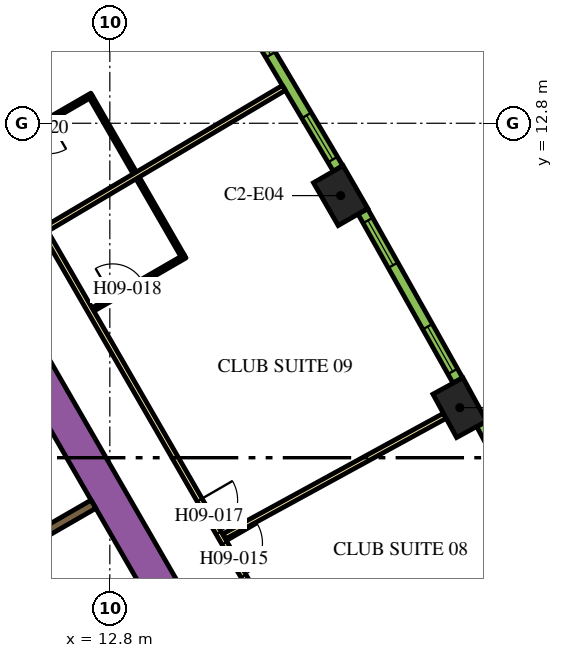
"""IFC4 building model, lengths in metres.
Left out: names, types, materials, properties, quantities, classifications, styles, units other than length and angle.
Written with IfcOpenShell. Run it as: python <this file> out.ifc"""

import sys

from ifc_helpers import new_model, si_unit, direction, frame, frame_2d, origin, origin_2d, place, context, subcontext, project, spatial, rectangle, extrude, element, fill, save


model = new_model("IFC4")
c1 = context("Model", 3, precision=1e-05, world=origin(), true_north=direction((0.0, 1.0)))
c2 = subcontext(c1, "Body", "Model", "MODEL_VIEW")
j1 = project(units=[si_unit("LENGTHUNIT", "METRE"), si_unit("PLANEANGLEUNIT", "RADIAN")], contexts=[c1])
p1 = place(None, origin())
s1 = spatial("IfcSite", under=j1, at=p1, CompositionType="ELEMENT")
p2 = place(p1, origin())
s2 = spatial("IfcBuilding", under=s1, at=p2, CompositionType="ELEMENT")
p3 = place(p2, frame((0.0, 0.0, 126.6)))
s3 = spatial("IfcBuildingStorey", under=s2, at=p3, CompositionType="ELEMENT", Elevation=126.6)
for number, where, z_axis, x_axis in (
    (1, (22.009, 5.317, 0.0), (0.0, 0.0, 1.0), (-0.48, 0.877, 0.0)),
    (2, (18.874, 10.897, 0.0), (0.0, 0.0, 1.0), (-0.5, 0.866, 0.0)),
):
    element("IfcColumn", number, at=place(p3, frame(where, z_axis=z_axis, x_axis=x_axis)), inside=s3, PredefinedType="COLUMN", context=c2, shape_type="SweptSolid", body=[
        extrude(rectangle(XDim=1.3, YDim=0.9, at=origin_2d()), origin(), (0.0, 0.0, 1.0), 3.9),
    ])
p4 = place(p3, frame((6.776, 13.364, 0.0), z_axis=(0.0, 0.0, 1.0), x_axis=(0.500004177138, -0.8660229921, 0.0)))
e3 = element("IfcWall", 3, at=p4, inside=s3, PredefinedType="SOLIDWALL", context=c2, shape_type="SweptSolid", body=[
    extrude(rectangle(XDim=20.204, YDim=0.9, at=frame_2d((10.102, 0.0))), origin(), (0.0, 0.0, 1.0), 3.9),
])
p5 = place(p3, frame((10.464, 1.677, 0.0), z_axis=(0.0, 0.0, 1.0), x_axis=(0.86605622881, 0.499946605688, 0.0)))
e4 = element("IfcWall", 4, at=p5, inside=s3, PredefinedType="SOLIDWALL", context=c2, shape_type="SweptSolid", body=[
    extrude(rectangle(XDim=2.2, YDim=0.25, at=frame_2d((1.1, 0.0))), origin(), (0.0, 0.0, 1.0), 3.9),
])
p6 = place(p3, frame((11.553, -0.46, 0.0), z_axis=(0.0, 0.0, 1.0), x_axis=(-0.500006514828, 0.866021642414, 0.0)))
e5 = element("IfcWall", 5, at=p6, inside=s3, PredefinedType="SOLIDWALL", context=c2, shape_type="SweptSolid", body=[
    extrude(rectangle(XDim=12.35, YDim=0.25, at=frame_2d((6.175, 0.0))), origin(), (0.0, 0.0, 1.0), 3.9),
])
p7 = place(p6, frame((0.585, 0.0, 0.0)))
e6 = element("IfcOpeningElement", 6, at=p7, cuts=e5, PredefinedType="OPENING", context=c2, shape_type="SweptSolid", body=[
    extrude(rectangle(XDim=1.1, YDim=2.1, at=frame_2d((0.55, 1.05))), frame((0.0, 0.135, 0.0), z_axis=(0.0, -1.0, 0.0), x_axis=(1.0, 0.0, 0.0)), (0.0, 0.0, 1.0), 0.27),
])
p8 = place(p6, frame((3.105, 0.0, 0.0)))
e7 = element("IfcOpeningElement", 7, at=p8, cuts=e5, PredefinedType="OPENING", context=c2, shape_type="SweptSolid", body=[
    extrude(rectangle(XDim=1.1, YDim=2.1, at=frame_2d((0.55, 1.05))), frame((0.0, 0.135, 0.0), z_axis=(0.0, -1.0, 0.0), x_axis=(1.0, 0.0, 0.0)), (0.0, 0.0, 1.0), 0.27),
])
p9 = place(p6, frame((5.625, 0.0, 0.0)))
e8 = element("IfcOpeningElement", 8, at=p9, cuts=e5, PredefinedType="OPENING", context=c2, shape_type="SweptSolid", body=[
    extrude(rectangle(XDim=1.1, YDim=2.1, at=frame_2d((0.55, 1.05))), frame((0.0, 0.135, 0.0), z_axis=(0.0, -1.0, 0.0), x_axis=(1.0, 0.0, 0.0)), (0.0, 0.0, 1.0), 0.27),
])
p10 = place(p3, frame((6.163, 18.475, 0.0), z_axis=(0.0, 0.0, 1.0), x_axis=(0.500001317485, -0.866024643133, 0.0)))
e9 = element("IfcWall", 9, at=p10, inside=s3, PredefinedType="PARTITIONING", context=c2, shape_type="SweptSolid", body=[
    extrude(rectangle(XDim=25.767, YDim=0.15, at=frame_2d((12.883, 0.0))), origin(), (0.0, 0.0, 1.0), 2.75),
])
p11 = place(p10, frame((19.306, 0.0, 0.0)))
e10 = element("IfcOpeningElement", 10, at=p11, cuts=e9, PredefinedType="OPENING", context=c2, shape_type="SweptSolid", body=[
    extrude(rectangle(XDim=1.0, YDim=2.1, at=frame_2d((0.5, 1.05))), frame((0.0, 0.085, 0.0), z_axis=(0.0, -1.0, 0.0), x_axis=(1.0, 0.0, 0.0)), (0.0, 0.0, 1.0), 0.17),
])
p12 = place(p10, frame((17.999, 0.0, 0.0)))
e11 = element("IfcOpeningElement", 11, at=p12, cuts=e9, PredefinedType="OPENING", context=c2, shape_type="SweptSolid", body=[
    extrude(rectangle(XDim=1.0, YDim=2.1, at=frame_2d((0.5, 1.05))), frame((0.0, 0.085, 0.0), z_axis=(0.0, -1.0, 0.0), x_axis=(1.0, 0.0, 0.0)), (0.0, 0.0, 1.0), 0.17),
])
p13 = place(p10, frame((0.596, 0.0, 0.0)))
e12 = element("IfcOpeningElement", 12, at=p13, cuts=e9, PredefinedType="OPENING", context=c2, shape_type="SweptSolid", body=[
    extrude(rectangle(XDim=1.0, YDim=2.1, at=frame_2d((0.5, 1.05))), frame((0.0, 0.085, 0.0), z_axis=(0.0, -1.0, 0.0), x_axis=(1.0, 0.0, 0.0)), (0.0, 0.0, 1.0), 0.17),
])
p14 = place(p3, frame((17.379, 13.731, 0.0), z_axis=(0.0, 0.0, 1.0), x_axis=(-0.860132461691, -0.510070728768, 0.0)))
e13 = element("IfcWall", 13, at=p14, inside=s3, PredefinedType="PARTITIONING", context=c2, shape_type="SweptSolid", body=[
    extrude(rectangle(XDim=7.257, YDim=0.15, at=frame_2d((3.628, 0.0))), origin(), (0.0, 0.0, 1.0), 2.75),
])
p15 = place(p3, frame((21.614, 5.102, 0.0), z_axis=(0.0, 0.0, 1.0), x_axis=(-0.877484555087, -0.479604895287, 0.0)))
e14 = element("IfcWall", 14, at=p15, inside=s3, PredefinedType="PARTITIONING", context=c2, shape_type="SweptSolid", body=[
    extrude(rectangle(XDim=6.611, YDim=0.15, at=frame_2d((3.306, 0.0))), origin(), (0.0, 0.0, 1.0), 2.75),
])
p16 = place(p3, frame((12.355, 7.9, 0.0), z_axis=(0.0, 0.0, 1.0), x_axis=(0.866034573852, 0.49998411664, 0.0)))
e15 = element("IfcWall", 15, at=p16, inside=s3, PredefinedType="PARTITIONING", context=c2, shape_type="SweptSolid", body=[
    extrude(rectangle(XDim=2.8, YDim=0.1, at=frame_2d((1.4, 0.0))), origin(), (0.0, 0.0, 1.0), 2.75),
])
p17 = place(p16, frame((0.6, 0.0, 0.0)))
e16 = element("IfcOpeningElement", 16, at=p17, cuts=e15, PredefinedType="OPENING", context=c2, shape_type="SweptSolid", body=[
    extrude(rectangle(XDim=0.9, YDim=2.1, at=frame_2d((0.45, 1.05))), frame((0.0, 0.06, 0.0), z_axis=(0.0, -1.0, 0.0), x_axis=(1.0, 0.0, 0.0)), (0.0, 0.0, 1.0), 0.12),
])
p18 = place(p3, frame((14.712, 9.318, 0.0), z_axis=(0.0, 0.0, 1.0), x_axis=(-0.50000006957, 0.866025363618, 0.0)))
e17 = element("IfcWall", 17, at=p18, inside=s3, PredefinedType="PARTITIONING", context=c2, shape_type="SweptSolid", body=[
    extrude(rectangle(XDim=2.36, YDim=0.1, at=frame_2d((1.18, 0.0))), origin(), (0.0, 0.0, 1.0), 2.75),
])
p19 = place(p3, frame((12.327, 13.549, 0.0), z_axis=(0.0, 0.0, 1.0), x_axis=(-0.866056369097, -0.49994636267, 0.0)))
e18 = element("IfcWall", 18, at=p19, inside=s3, PredefinedType="PARTITIONING", context=c2, shape_type="SweptSolid", body=[
    extrude(rectangle(XDim=2.8, YDim=0.1, at=frame_2d((1.4, 0.0))), origin(), (0.0, 0.0, 1.0), 2.75),
])
p20 = place(p19, frame((1.3, 0.0, 0.0)))
e19 = element("IfcOpeningElement", 19, at=p20, cuts=e18, PredefinedType="OPENING", context=c2, shape_type="SweptSolid", body=[
    extrude(rectangle(XDim=0.9, YDim=2.1, at=frame_2d((0.45, 1.05))), frame((0.0, 0.06, 0.0), z_axis=(0.0, -1.0, 0.0), x_axis=(1.0, 0.0, 0.0)), (0.0, 0.0, 1.0), 0.12),
])
p21 = place(p3, frame((12.309, 13.481, 0.0), z_axis=(0.0, 0.0, 1.0), x_axis=(0.499968531483, -0.866043571379, 0.0)))
e20 = element("IfcWall", 20, at=p21, inside=s3, PredefinedType="PARTITIONING", context=c2, shape_type="SweptSolid", body=[
    extrude(rectangle(XDim=2.29, YDim=0.1, at=frame_2d((1.145, 0.0))), origin(), (0.0, 0.0, 1.0), 2.75),
])
p22 = place(p3, frame((24.977, 0.383, 0.0), z_axis=(0.0, 0.0, 1.0), x_axis=(-0.469323203119, 0.883026461106, 0.0)))
e21 = element("IfcWall", 21, at=p22, inside=s3, PredefinedType="SOLIDWALL", context=c2, shape_type="SweptSolid", body=[
    extrude(rectangle(XDim=5.101, YDim=0.29, at=frame_2d((2.55, 0.0))), origin(), (0.0, 0.0, 1.0), 3.65),
])
p23 = place(p22, frame((0.273, 0.0, 0.9)))
e22 = element("IfcOpeningElement", 22, at=p23, cuts=e21, PredefinedType="OPENING", context=c2, shape_type="SweptSolid", body=[
    extrude(rectangle(XDim=1.35, YDim=2.15, at=frame_2d((0.675, 1.075))), frame((0.0, 0.155, 0.0), z_axis=(0.0, -1.0, 0.0), x_axis=(1.0, 0.0, 0.0)), (0.0, 0.0, 1.0), 0.31),
])
p24 = place(p22, frame((3.478, 0.0, 0.9)))
e23 = element("IfcOpeningElement", 23, at=p24, cuts=e21, PredefinedType="OPENING", context=c2, shape_type="SweptSolid", body=[
    extrude(rectangle(XDim=1.35, YDim=2.15, at=frame_2d((0.675, 1.075))), frame((0.0, 0.155, 0.0), z_axis=(0.0, -1.0, 0.0), x_axis=(1.0, 0.0, 0.0)), (0.0, 0.0, 1.0), 0.31),
])
p25 = place(p3, frame((21.956, 6.033, 0.0), z_axis=(0.0, 0.0, 1.0), x_axis=(-0.48983164787, 0.87181704316, 0.0)))
e24 = element("IfcWall", 24, at=p25, inside=s3, PredefinedType="SOLIDWALL", context=c2, shape_type="SweptSolid", body=[
    extrude(rectangle(XDim=5.1, YDim=0.29, at=frame_2d((2.55, 0.0))), origin(), (0.0, 0.0, 1.0), 3.65),
])
p26 = place(p25, frame((0.273, 0.0, 0.9)))
e25 = element("IfcOpeningElement", 25, at=p26, cuts=e24, PredefinedType="OPENING", context=c2, shape_type="SweptSolid", body=[
    extrude(rectangle(XDim=1.35, YDim=2.15, at=frame_2d((0.675, 1.075))), frame((0.0, 0.155, 0.0), z_axis=(0.0, -1.0, 0.0), x_axis=(1.0, 0.0, 0.0)), (0.0, 0.0, 1.0), 0.31),
])
p27 = place(p25, frame((3.478, 0.0, 0.9)))
e26 = element("IfcOpeningElement", 26, at=p27, cuts=e24, PredefinedType="OPENING", context=c2, shape_type="SweptSolid", body=[
    extrude(rectangle(XDim=1.35, YDim=2.15, at=frame_2d((0.675, 1.075))), frame((0.0, 0.155, 0.0), z_axis=(0.0, -1.0, 0.0), x_axis=(1.0, 0.0, 0.0)), (0.0, 0.0, 1.0), 0.31),
])
p28 = place(p3, frame((18.805, 11.611, 0.0), z_axis=(0.0, 0.0, 1.0), x_axis=(-0.510054281659, 0.860142214847, 0.0)))
e27 = element("IfcWall", 27, at=p28, inside=s3, PredefinedType="SOLIDWALL", context=c2, shape_type="SweptSolid", body=[
    extrude(rectangle(XDim=5.101, YDim=0.29, at=frame_2d((2.55, 0.0))), origin(), (0.0, 0.0, 1.0), 3.65),
])
p29 = place(p28, frame((0.273, 0.0, 0.9)))
e28 = element("IfcOpeningElement", 28, at=p29, cuts=e27, PredefinedType="OPENING", context=c2, shape_type="SweptSolid", body=[
    extrude(rectangle(XDim=1.35, YDim=2.15, at=frame_2d((0.675, 1.075))), frame((0.0, 0.155, 0.0), z_axis=(0.0, -1.0, 0.0), x_axis=(1.0, 0.0, 0.0)), (0.0, 0.0, 1.0), 0.31),
])
p30 = place(p28, frame((3.478, 0.0, 0.9)))
e29 = element("IfcOpeningElement", 29, at=p30, cuts=e27, PredefinedType="OPENING", context=c2, shape_type="SweptSolid", body=[
    extrude(rectangle(XDim=1.35, YDim=2.15, at=frame_2d((0.675, 1.075))), frame((0.0, 0.155, 0.0), z_axis=(0.0, -1.0, 0.0), x_axis=(1.0, 0.0, 0.0)), (0.0, 0.0, 1.0), 0.31),
])
p31 = place(p7, origin())
e30 = element("IfcDoor", 30, at=p31, inside=s3, OperationType="DOUBLE_DOOR_SLIDING", PredefinedType="DOOR", context=c2, shape_type="SweptSolid", body=[
    extrude(rectangle(XDim=1.1, YDim=2.1, at=frame_2d((0.55, 1.05))), frame((0.0, 0.025, 0.0), z_axis=(0.0, -1.0, 0.0), x_axis=(1.0, 0.0, 0.0)), (0.0, 0.0, 1.0), 0.05),
])
fill(e6, e30)
p32 = place(p11, origin())
e31 = element("IfcDoor", 31, at=p32, inside=s3, OperationType="SINGLE_SWING_LEFT", PredefinedType="DOOR", context=c2, shape_type="SweptSolid", body=[
    extrude(rectangle(XDim=1.0, YDim=2.1, at=frame_2d((0.5, 1.05))), frame((0.0, 0.025, 0.0), z_axis=(0.0, -1.0, 0.0), x_axis=(1.0, 0.0, 0.0)), (0.0, 0.0, 1.0), 0.05),
])
fill(e10, e31)
p33 = place(p12, origin())
e32 = element("IfcDoor", 32, at=p33, inside=s3, OperationType="SINGLE_SWING_RIGHT", PredefinedType="DOOR", context=c2, shape_type="SweptSolid", body=[
    extrude(rectangle(XDim=1.0, YDim=2.1, at=frame_2d((0.5, 1.05))), frame((0.0, 0.025, 0.0), z_axis=(0.0, -1.0, 0.0), x_axis=(1.0, 0.0, 0.0)), (0.0, 0.0, 1.0), 0.05),
])
fill(e11, e32)
p34 = place(p17, origin())
e33 = element("IfcDoor", 33, at=p34, inside=s3, OperationType="SINGLE_SWING_RIGHT", PredefinedType="DOOR", context=c2, shape_type="SweptSolid", body=[
    extrude(rectangle(XDim=0.9, YDim=2.1, at=frame_2d((0.45, 1.05))), frame((0.0, 0.025, 0.0), z_axis=(0.0, -1.0, 0.0), x_axis=(1.0, 0.0, 0.0)), (0.0, 0.0, 1.0), 0.05),
])
fill(e16, e33)
p35 = place(p26, origin())
e34 = element("IfcWindow", 34, at=p35, inside=s3, PartitioningType="DOUBLE_PANEL_VERTICAL", PredefinedType="WINDOW", context=c2, shape_type="SweptSolid", body=[
    extrude(rectangle(XDim=1.35, YDim=2.15, at=frame_2d((0.675, 1.075))), frame((0.0, 0.015, 0.0), z_axis=(0.0, -1.0, 0.0), x_axis=(1.0, 0.0, 0.0)), (0.0, 0.0, 1.0), 0.06),
])
fill(e25, e34)
p36 = place(p27, origin())
e35 = element("IfcWindow", 35, at=p36, inside=s3, PartitioningType="DOUBLE_PANEL_VERTICAL", PredefinedType="WINDOW", context=c2, shape_type="SweptSolid", body=[
    extrude(rectangle(XDim=1.35, YDim=2.15, at=frame_2d((0.675, 1.075))), frame((0.0, 0.015, 0.0), z_axis=(0.0, -1.0, 0.0), x_axis=(1.0, 0.0, 0.0)), (0.0, 0.0, 1.0), 0.06),
])
fill(e26, e35)
p37 = place(p29, origin())
e36 = element("IfcWindow", 36, at=p37, inside=s3, PartitioningType="DOUBLE_PANEL_VERTICAL", PredefinedType="WINDOW", context=c2, shape_type="SweptSolid", body=[
    extrude(rectangle(XDim=1.35, YDim=2.15, at=frame_2d((0.675, 1.075))), frame((0.0, 0.015, 0.0), z_axis=(0.0, -1.0, 0.0), x_axis=(1.0, 0.0, 0.0)), (0.0, 0.0, 1.0), 0.06),
])
fill(e28, e36)
p38 = place(p30, origin())
e37 = element("IfcWindow", 37, at=p38, inside=s3, PartitioningType="DOUBLE_PANEL_VERTICAL", PredefinedType="WINDOW", context=c2, shape_type="SweptSolid", body=[
    extrude(rectangle(XDim=1.35, YDim=2.15, at=frame_2d((0.675, 1.075))), frame((0.0, 0.015, 0.0), z_axis=(0.0, -1.0, 0.0), x_axis=(1.0, 0.0, 0.0)), (0.0, 0.0, 1.0), 0.06),
])
fill(e29, e37)
save(model, sys.argv[1])
